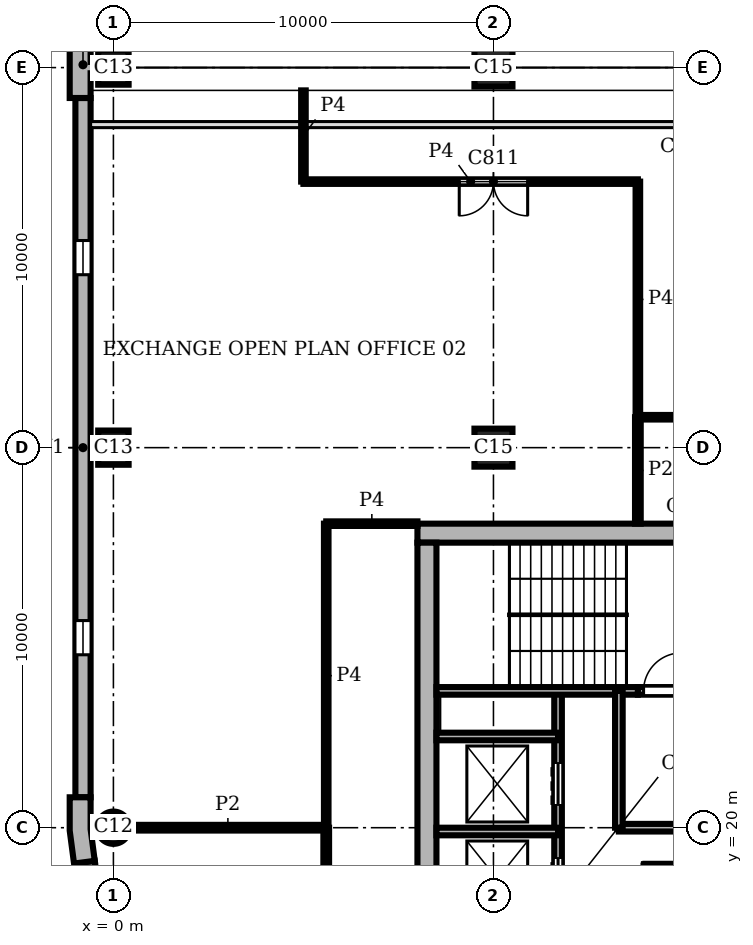
"""IFC4 building model, lengths in metres.
Left out: names, types, materials, properties, quantities, classifications, styles, units other than length and angle.
Written with IfcOpenShell. Run it as: python <this file> out.ifc"""

import sys

from ifc_helpers import new_model, si_unit, direction, frame, frame_2d, origin, origin_2d, place, context, subcontext, project, spatial, polyline, rectangle, circle, outline, extrude, element, fill, save


model = new_model("IFC4")
c1 = context("Model", 3, precision=1e-05, world=origin(), true_north=direction((0.0, 1.0)))
c2 = subcontext(c1, "Body", "Model", "MODEL_VIEW")
j1 = project(units=[si_unit("LENGTHUNIT", "METRE"), si_unit("PLANEANGLEUNIT", "RADIAN")], contexts=[c1])
p1 = place(None, origin())
s1 = spatial("IfcSite", under=j1, at=p1, CompositionType="ELEMENT")
p2 = place(p1, origin())
s2 = spatial("IfcBuilding", under=s1, at=p2, CompositionType="ELEMENT")
p3 = place(p2, frame((0.0, 0.0, 317.7)))
s3 = spatial("IfcBuildingStorey", under=s2, at=p3, CompositionType="ELEMENT", Elevation=317.7)
for number, where, z_axis, x_axis in (
    (1, (0.0, 40.0, 0.0), (0.0, 0.0, 1.0), (0.0, 1.0, 0.0)),
    (2, (0.0, 30.0, 0.0), (0.0, 0.0, 1.0), (0.0, 1.0, 0.0)),
):
    element("IfcColumn", number, at=place(p3, frame(where, z_axis=z_axis, x_axis=x_axis)), inside=s3, PredefinedType="COLUMN", context=c2, shape_type="SweptSolid", body=[
        extrude(rectangle(XDim=0.9, YDim=0.8, at=origin_2d()), origin(), (0.0, 0.0, 1.0), 3.9),
    ])
p4 = place(p3, frame((0.0, 20.0, 0.0), z_axis=(0.0, 0.0, 1.0), x_axis=(1.0, 0.0, 0.0)))
e3 = element("IfcColumn", 3, at=p4, inside=s3, PredefinedType="COLUMN", context=c2, shape_type="SweptSolid", body=[
    extrude(circle(Radius=0.425, at=origin_2d()), origin(), (0.0, 0.0, 1.0), 3.9),
])
for number, where, z_axis, x_axis in (
    (4, (10.0, 30.0, 0.0), (0.0, 0.0, 1.0), (1.0, 0.0, 0.0)),
    (5, (10.0, 40.0, 0.0), (0.0, 0.0, 1.0), (1.0, 0.0, 0.0)),
):
    element("IfcColumn", number, at=place(p3, frame(where, z_axis=z_axis, x_axis=x_axis)), inside=s3, PredefinedType="COLUMN", context=c2, shape_type="SweptSolid", body=[
        extrude(rectangle(XDim=1.0, YDim=1.0, at=origin_2d()), origin(), (0.0, 0.0, 1.0), 3.9),
    ])
p5 = place(p3, frame((28.0, 27.75, 0.0), z_axis=(0.0, 0.0, 1.0), x_axis=(-1.0, 0.0, 0.0)))
e6 = element("IfcWall", 6, at=p5, inside=s3, PredefinedType="SHEAR", context=c2, shape_type="SweptSolid", body=[
    extrude(rectangle(XDim=20.0, YDim=0.5, at=frame_2d((10.0, 0.0))), origin(), (0.0, 0.0, 1.0), 3.9),
])
p6 = place(p3, frame((8.25, 27.5, 0.0), z_axis=(0.0, 0.0, 1.0), x_axis=(0.0, -1.0, 0.0)))
e7 = element("IfcWall", 7, at=p6, inside=s3, PredefinedType="SHEAR", context=c2, shape_type="SweptSolid", body=[
    extrude(rectangle(XDim=19.0, YDim=0.5, at=frame_2d((9.5, 0.0))), origin(), (0.0, 0.0, 1.0), 3.9),
])
p7 = place(p3, origin())
e8 = element("IfcWall", 8, at=p7, inside=s3, PredefinedType="SOLIDWALL", context=c2, shape_type="SweptSolid", body=[
    extrude(outline(polyline([(-0.6, 39.2), (-0.6, 39.85), (-0.45, 39.85), (-0.45, 40.15), (-0.6, 40.15), (-0.6, 40.8), (-1.0, 40.8), (-1.15, 40.8), (-1.15, 40.0), (-1.15, 39.2), (-1.0, 39.2), (-0.6, 39.2)])), origin(), (0.0, 0.0, 1.0), 3.9),
])
e9 = element("IfcWall", 9, at=p7, inside=s3, PredefinedType="SOLIDWALL", context=c2, shape_type="SweptSolid", body=[
    extrude(outline(polyline([(-1.0, 20.8), (-1.15, 20.8), (-1.15, 19.925), (-1.036, 19.057), (-0.887, 19.076), (-0.49, 19.128), (-0.6, 19.961), (-0.6, 20.8), (-1.0, 20.8)])), origin(), (0.0, 0.0, 1.0), 3.9),
])
p8 = place(p3, frame((-0.8, 39.2, 0.0), z_axis=(0.0, 0.0, 1.0), x_axis=(0.0, -1.0, 0.0)))
e10 = element("IfcWall", 10, at=p8, inside=s3, PredefinedType="SOLIDWALL", context=c2, shape_type="SweptSolid", body=[
    extrude(rectangle(XDim=18.4, YDim=0.4, at=frame_2d((9.2, 0.0))), origin(), (0.0, 0.0, 1.0), 3.9),
])
p9 = place(p8, frame((3.75, 0.0, 0.9)))
e11 = element("IfcOpeningElement", 11, at=p9, cuts=e10, PredefinedType="OPENING", context=c2, shape_type="SweptSolid", body=[
    extrude(rectangle(XDim=0.9, YDim=2.35, at=frame_2d((0.45, 1.175))), frame((0.0, 0.21, 0.0), z_axis=(0.0, -1.0, 0.0), x_axis=(1.0, 0.0, 0.0)), (0.0, 0.0, 1.0), 0.42),
])
p10 = place(p8, frame((13.75, 0.0, 0.9)))
e12 = element("IfcOpeningElement", 12, at=p10, cuts=e10, PredefinedType="OPENING", context=c2, shape_type="SweptSolid", body=[
    extrude(rectangle(XDim=0.9, YDim=2.35, at=frame_2d((0.45, 1.175))), frame((0.0, 0.21, 0.0), z_axis=(0.0, -1.0, 0.0), x_axis=(1.0, 0.0, 0.0)), (0.0, 0.0, 1.0), 0.42),
])
p11 = place(p3, frame((-0.689, 19.102, 0.0), z_axis=(0.0, 0.0, 1.0), x_axis=(0.130514280502, -0.991446429508, 0.0)))
e13 = element("IfcWall", 13, at=p11, inside=s3, PredefinedType="SOLIDWALL", context=c2, shape_type="SweptSolid", body=[
    extrude(rectangle(XDim=4.121, YDim=0.4, at=frame_2d((2.061, 0.0))), origin(), (0.0, 0.0, 1.0), 3.9),
])
p12 = place(p11, frame((1.611, 0.0, 0.9)))
e14 = element("IfcOpeningElement", 14, at=p12, cuts=e13, PredefinedType="OPENING", context=c2, shape_type="SweptSolid", body=[
    extrude(rectangle(XDim=0.9, YDim=2.35, at=frame_2d((0.45, 1.175))), frame((0.0, 0.21, 0.0), z_axis=(0.0, -1.0, 0.0), x_axis=(1.0, 0.0, 0.0)), (0.0, 0.0, 1.0), 0.42),
])
p13 = place(p3, frame((14.0, 19.0, 0.0), z_axis=(0.0, 0.0, 1.0), x_axis=(1.0, 0.0, 0.0)))
e15 = element("IfcWall", 15, at=p13, inside=s3, PredefinedType="PARTITIONING", context=c2, shape_type="SweptSolid", body=[
    extrude(rectangle(XDim=8.0, YDim=0.1, at=frame_2d((4.0, 0.0))), origin(), (0.0, 0.0, 1.0), 3.58),
])
p14 = place(p13, frame((5.45, 0.0, 0.0)))
e16 = element("IfcOpeningElement", 16, at=p14, cuts=e15, PredefinedType="OPENING", context=c2, shape_type="SweptSolid", body=[
    extrude(rectangle(XDim=1.1, YDim=2.1, at=frame_2d((0.55, 1.05))), frame((0.0, 0.06, 0.0), z_axis=(0.0, -1.0, 0.0), x_axis=(1.0, 0.0, 0.0)), (0.0, 0.0, 1.0), 0.12),
])
p15 = place(p3, frame((8.5, 19.9, 0.0), z_axis=(0.0, 0.0, 1.0), x_axis=(1.0, 0.0, 0.0)))
e17 = element("IfcWall", 17, at=p15, inside=s3, PredefinedType="SHEAR", context=c2, shape_type="SweptSolid", body=[
    extrude(rectangle(XDim=3.2, YDim=0.2, at=frame_2d((1.6, 0.0))), origin(), (0.0, 0.0, 1.0), 3.58),
])
p16 = place(p3, frame((13.3, 20.0, 0.0), z_axis=(0.0, 0.0, 1.0), x_axis=(1.0, 0.0, 0.0)))
e18 = element("IfcWall", 18, at=p16, inside=s3, PredefinedType="SHEAR", context=c2, shape_type="SweptSolid", body=[
    extrude(rectangle(XDim=4.7, YDim=0.2, at=frame_2d((2.35, 0.0))), origin(), (0.0, 0.0, 1.0), 3.58),
])
p17 = place(p3, frame((8.5, 22.4, 0.0), z_axis=(0.0, 0.0, 1.0), x_axis=(1.0, 0.0, 0.0)))
e19 = element("IfcWall", 19, at=p17, inside=s3, PredefinedType="SHEAR", context=c2, shape_type="SweptSolid", body=[
    extrude(rectangle(XDim=3.2, YDim=0.2, at=frame_2d((1.6, 0.0))), origin(), (0.0, 0.0, 1.0), 3.58),
])
p18 = place(p3, frame((8.5, 23.6, 0.0), z_axis=(0.0, 0.0, 1.0), x_axis=(1.0, 0.0, 0.0)))
e20 = element("IfcWall", 20, at=p18, inside=s3, PredefinedType="SHEAR", context=c2, shape_type="SweptSolid", body=[
    extrude(rectangle(XDim=5.3, YDim=0.2, at=frame_2d((2.65, 0.0))), origin(), (0.0, 0.0, 1.0), 3.58),
])
p19 = place(p3, frame((13.8, 23.6, 0.0), z_axis=(0.0, 0.0, 1.0), x_axis=(1.0, 0.0, 0.0)))
e21 = element("IfcWall", 21, at=p19, inside=s3, PredefinedType="SHEAR", context=c2, shape_type="SweptSolid", body=[
    extrude(rectangle(XDim=13.7, YDim=0.2, at=frame_2d((6.85, 0.0))), origin(), (0.0, 0.0, 1.0), 3.58),
])
p20 = place(p19, frame((2.4, 0.0, 0.0)))
e22 = element("IfcOpeningElement", 22, at=p20, cuts=e21, PredefinedType="OPENING", context=c2, shape_type="SweptSolid", body=[
    extrude(rectangle(XDim=1.1, YDim=2.1, at=frame_2d((0.55, 1.05))), frame((0.0, 0.11, 0.0), z_axis=(0.0, -1.0, 0.0), x_axis=(1.0, 0.0, 0.0)), (0.0, 0.0, 1.0), 0.22),
])
p21 = place(p19, frame((4.9, 0.0, 0.0)))
e23 = element("IfcOpeningElement", 23, at=p21, cuts=e21, PredefinedType="OPENING", context=c2, shape_type="SweptSolid", body=[
    extrude(rectangle(XDim=1.1, YDim=2.1, at=frame_2d((0.55, 1.05))), frame((0.0, 0.11, 0.0), z_axis=(0.0, -1.0, 0.0), x_axis=(1.0, 0.0, 0.0)), (0.0, 0.0, 1.0), 0.22),
])
p22 = place(p19, frame((0.15, 0.0, 0.0)))
e24 = element("IfcOpeningElement", 24, at=p22, cuts=e21, PredefinedType="OPENING", context=c2, shape_type="SweptSolid", body=[
    extrude(rectangle(XDim=1.0, YDim=2.1, at=frame_2d((0.5, 1.05))), frame((0.0, 0.11, 0.0), z_axis=(0.0, -1.0, 0.0), x_axis=(1.0, 0.0, 0.0)), (0.0, 0.0, 1.0), 0.22),
])
p23 = place(p3, frame((11.7, 12.4, 0.0), z_axis=(0.0, 0.0, 1.0), x_axis=(0.0, 1.0, 0.0)))
e25 = element("IfcWall", 25, at=p23, inside=s3, PredefinedType="SHEAR", context=c2, shape_type="SweptSolid", body=[
    extrude(rectangle(XDim=11.2, YDim=0.2, at=frame_2d((5.6, 0.0))), origin(), (0.0, 0.0, 1.0), 3.58),
])
p24 = place(p23, frame((0.7, 0.0, 0.0)))
e26 = element("IfcOpeningElement", 26, at=p24, cuts=e25, PredefinedType="OPENING", context=c2, shape_type="SweptSolid", body=[
    extrude(rectangle(XDim=1.1, YDim=2.1, at=frame_2d((0.55, 1.05))), frame((0.0, 0.11, 0.0), z_axis=(0.0, -1.0, 0.0), x_axis=(1.0, 0.0, 0.0)), (0.0, 0.0, 1.0), 0.22),
])
p25 = place(p23, frame((3.2, 0.0, 0.0)))
e27 = element("IfcOpeningElement", 27, at=p25, cuts=e25, PredefinedType="OPENING", context=c2, shape_type="SweptSolid", body=[
    extrude(rectangle(XDim=1.1, YDim=2.1, at=frame_2d((0.55, 1.05))), frame((0.0, 0.11, 0.0), z_axis=(0.0, -1.0, 0.0), x_axis=(1.0, 0.0, 0.0)), (0.0, 0.0, 1.0), 0.22),
])
p26 = place(p23, frame((5.7, 0.0, 0.0)))
e28 = element("IfcOpeningElement", 28, at=p26, cuts=e25, PredefinedType="OPENING", context=c2, shape_type="SweptSolid", body=[
    extrude(rectangle(XDim=1.1, YDim=2.1, at=frame_2d((0.55, 1.05))), frame((0.0, 0.11, 0.0), z_axis=(0.0, -1.0, 0.0), x_axis=(1.0, 0.0, 0.0)), (0.0, 0.0, 1.0), 0.22),
])
p27 = place(p23, frame((8.2, 0.0, 0.0)))
e29 = element("IfcOpeningElement", 29, at=p27, cuts=e25, PredefinedType="OPENING", context=c2, shape_type="SweptSolid", body=[
    extrude(rectangle(XDim=1.1, YDim=2.1, at=frame_2d((0.55, 1.05))), frame((0.0, 0.11, 0.0), z_axis=(0.0, -1.0, 0.0), x_axis=(1.0, 0.0, 0.0)), (0.0, 0.0, 1.0), 0.22),
])
p28 = place(p3, frame((13.3, 20.0, 0.0), z_axis=(0.0, 0.0, 1.0), x_axis=(0.0, 1.0, 0.0)))
e30 = element("IfcWall", 30, at=p28, inside=s3, PredefinedType="SHEAR", context=c2, shape_type="SweptSolid", body=[
    extrude(rectangle(XDim=3.6, YDim=0.2, at=frame_2d((1.8, 0.0))), origin(), (0.0, 0.0, 1.0), 3.58),
])
p29 = place(p3, frame((5.6, 15.0, 0.0), z_axis=(0.0, 0.0, 1.0), x_axis=(0.0, 1.0, 0.0)))
e31 = element("IfcWall", 31, at=p29, inside=s3, PredefinedType="PARTITIONING", context=c2, shape_type="SweptSolid", body=[
    extrude(rectangle(XDim=5.0, YDim=0.15, at=frame_2d((2.5, 0.0))), origin(), (0.0, 0.0, 1.0), 3.58),
])
p30 = place(p29, frame((2.1, 0.0, 0.0)))
e32 = element("IfcOpeningElement", 32, at=p30, cuts=e31, PredefinedType="OPENING", context=c2, shape_type="SweptSolid", body=[
    extrude(rectangle(XDim=0.8, YDim=2.1, at=frame_2d((0.4, 1.05))), frame((0.0, 0.085, 0.0), z_axis=(0.0, -1.0, 0.0), x_axis=(1.0, 0.0, 0.0)), (0.0, 0.0, 1.0), 0.17),
])
p31 = place(p3, frame((13.8, 28.0, 0.0), z_axis=(0.0, 0.0, 1.0), x_axis=(0.0, 1.0, 0.0)))
e33 = element("IfcWall", 33, at=p31, inside=s3, PredefinedType="PARTITIONING", context=c2, shape_type="SweptSolid", body=[
    extrude(rectangle(XDim=2.801, YDim=0.15, at=frame_2d((1.4, 0.0))), origin(), (0.0, 0.0, 1.0), 3.58),
])
p32 = place(p3, frame((0.425, 20.0, 0.0), z_axis=(0.0, 0.0, 1.0), x_axis=(1.0, 0.0, 0.0)))
e34 = element("IfcWall", 34, at=p32, inside=s3, PredefinedType="PARTITIONING", context=c2, shape_type="SweptSolid", body=[
    extrude(rectangle(XDim=5.175, YDim=0.15, at=frame_2d((2.587, 0.0))), origin(), (0.0, 0.0, 1.0), 3.58),
])
p33 = place(p3, frame((5.0, 37.0, 0.0), z_axis=(0.0, 0.0, 1.0), x_axis=(0.0, 1.0, 0.0)))
e35 = element("IfcWall", 35, at=p33, inside=s3, PredefinedType="PARTITIONING", context=c2, shape_type="SweptSolid", body=[
    extrude(rectangle(XDim=2.4, YDim=0.12, at=frame_2d((1.2, 0.0))), origin(), (0.0, 0.0, 1.0), 3.58),
])
p34 = place(p3, frame((5.6, 20.0, 0.0), z_axis=(0.0, 0.0, 1.0), x_axis=(0.0, 1.0, 0.0)))
e36 = element("IfcWall", 36, at=p34, inside=s3, PredefinedType="PARTITIONING", context=c2, shape_type="SweptSolid", body=[
    extrude(rectangle(XDim=8.0, YDim=0.12, at=frame_2d((4.0, 0.0))), origin(), (0.0, 0.0, 1.0), 3.58),
])
p35 = place(p3, frame((13.8, 30.8, 0.0), z_axis=(0.0, 0.0, 1.0), x_axis=(0.0, 1.0, 0.0)))
e37 = element("IfcWall", 37, at=p35, inside=s3, PredefinedType="PARTITIONING", context=c2, shape_type="SweptSolid", body=[
    extrude(rectangle(XDim=6.2, YDim=0.12, at=frame_2d((3.1, 0.0))), origin(), (0.0, 0.0, 1.0), 3.58),
])
p36 = place(p3, frame((5.6, 28.0, 0.0), z_axis=(0.0, 0.0, 1.0), x_axis=(1.0, 0.0, 0.0)))
e38 = element("IfcWall", 38, at=p36, inside=s3, PredefinedType="PARTITIONING", context=c2, shape_type="SweptSolid", body=[
    extrude(rectangle(XDim=2.4, YDim=0.12, at=frame_2d((1.2, 0.0))), origin(), (0.0, 0.0, 1.0), 3.58),
])
p37 = place(p3, frame((13.802, 30.8, 0.0), z_axis=(0.0, 0.0, 1.0), x_axis=(1.0, 0.0, 0.0)))
e39 = element("IfcWall", 39, at=p37, inside=s3, PredefinedType="PARTITIONING", context=c2, shape_type="SweptSolid", body=[
    extrude(rectangle(XDim=16.798, YDim=0.12, at=frame_2d((8.399, 0.0))), origin(), (0.0, 0.0, 1.0), 3.58),
])
p38 = place(p37, frame((10.1, 0.0, 0.0)))
e40 = element("IfcOpeningElement", 40, at=p38, cuts=e39, PredefinedType="OPENING", context=c2, shape_type="SweptSolid", body=[
    extrude(rectangle(XDim=1.0, YDim=2.1, at=frame_2d((0.5, 1.05))), frame((0.0, 0.07, 0.0), z_axis=(0.0, -1.0, 0.0), x_axis=(1.0, 0.0, 0.0)), (0.0, 0.0, 1.0), 0.14),
])
p39 = place(p3, frame((5.0, 37.0, 0.0), z_axis=(0.0, 0.0, 1.0), x_axis=(1.0, 0.0, 0.0)))
e41 = element("IfcWall", 41, at=p39, inside=s3, PredefinedType="PARTITIONING", context=c2, shape_type="SweptSolid", body=[
    extrude(rectangle(XDim=8.8, YDim=0.12, at=frame_2d((4.4, 0.0))), origin(), (0.0, 0.0, 1.0), 3.58),
])
p40 = place(p39, frame((4.1, 0.0, 0.0)))
e42 = element("IfcOpeningElement", 42, at=p40, cuts=e41, PredefinedType="OPENING", context=c2, shape_type="SweptSolid", body=[
    extrude(rectangle(XDim=1.8, YDim=2.1, at=frame_2d((0.9, 1.05))), frame((0.0, 0.07, 0.0), z_axis=(0.0, -1.0, 0.0), x_axis=(1.0, 0.0, 0.0)), (0.0, 0.0, 1.0), 0.14),
])
p41 = place(p9, origin())
e43 = element("IfcWindow", 43, at=p41, inside=s3, PartitioningType="SINGLE_PANEL", PredefinedType="WINDOW", context=c2, shape_type="SweptSolid", body=[
    extrude(rectangle(XDim=0.9, YDim=2.35, at=frame_2d((0.45, 1.175))), frame((0.0, 0.16, 0.0), z_axis=(0.0, -1.0, 0.0), x_axis=(1.0, 0.0, 0.0)), (0.0, 0.0, 1.0), 0.06),
])
fill(e11, e43)
p42 = place(p10, origin())
e44 = element("IfcWindow", 44, at=p42, inside=s3, PartitioningType="SINGLE_PANEL", PredefinedType="WINDOW", context=c2, shape_type="SweptSolid", body=[
    extrude(rectangle(XDim=0.9, YDim=2.35, at=frame_2d((0.45, 1.175))), frame((0.0, 0.16, 0.0), z_axis=(0.0, -1.0, 0.0), x_axis=(1.0, 0.0, 0.0)), (0.0, 0.0, 1.0), 0.06),
])
fill(e12, e44)
p43 = place(p26, origin())
e45 = element("IfcDoor", 45, at=p43, inside=s3, OperationType="DOUBLE_DOOR_SLIDING", PredefinedType="DOOR", context=c2, shape_type="SweptSolid", body=[
    extrude(rectangle(XDim=1.1, YDim=2.1, at=frame_2d((0.55, 1.05))), frame((0.0, 0.025, 0.0), z_axis=(0.0, -1.0, 0.0), x_axis=(1.0, 0.0, 0.0)), (0.0, 0.0, 1.0), 0.05),
])
fill(e28, e45)
p44 = place(p27, origin())
e46 = element("IfcDoor", 46, at=p44, inside=s3, OperationType="DOUBLE_DOOR_SLIDING", PredefinedType="DOOR", context=c2, shape_type="SweptSolid", body=[
    extrude(rectangle(XDim=1.1, YDim=2.1, at=frame_2d((0.55, 1.05))), frame((0.0, 0.025, 0.0), z_axis=(0.0, -1.0, 0.0), x_axis=(1.0, 0.0, 0.0)), (0.0, 0.0, 1.0), 0.05),
])
fill(e29, e46)
p45 = place(p22, origin())
e47 = element("IfcDoor", 47, at=p45, inside=s3, OperationType="SINGLE_SWING_RIGHT", PredefinedType="DOOR", context=c2, shape_type="SweptSolid", body=[
    extrude(rectangle(XDim=1.0, YDim=2.1, at=frame_2d((0.5, 1.05))), frame((0.0, 0.025, 0.0), z_axis=(0.0, -1.0, 0.0), x_axis=(1.0, 0.0, 0.0)), (0.0, 0.0, 1.0), 0.05),
])
fill(e24, e47)
p46 = place(p40, frame((1.8, 0.0, 0.0), z_axis=(0.0, 0.0, 1.0), x_axis=(-1.0, 0.0, 0.0)))
e48 = element("IfcDoor", 48, at=p46, inside=s3, OperationType="DOUBLE_DOOR_SINGLE_SWING", PredefinedType="DOOR", context=c2, shape_type="SweptSolid", body=[
    extrude(rectangle(XDim=1.8, YDim=2.1, at=frame_2d((0.9, 1.05))), frame((0.0, 0.025, 0.0), z_axis=(0.0, -1.0, 0.0), x_axis=(1.0, 0.0, 0.0)), (0.0, 0.0, 1.0), 0.05),
])
fill(e42, e48)
save(model, sys.argv[1])
